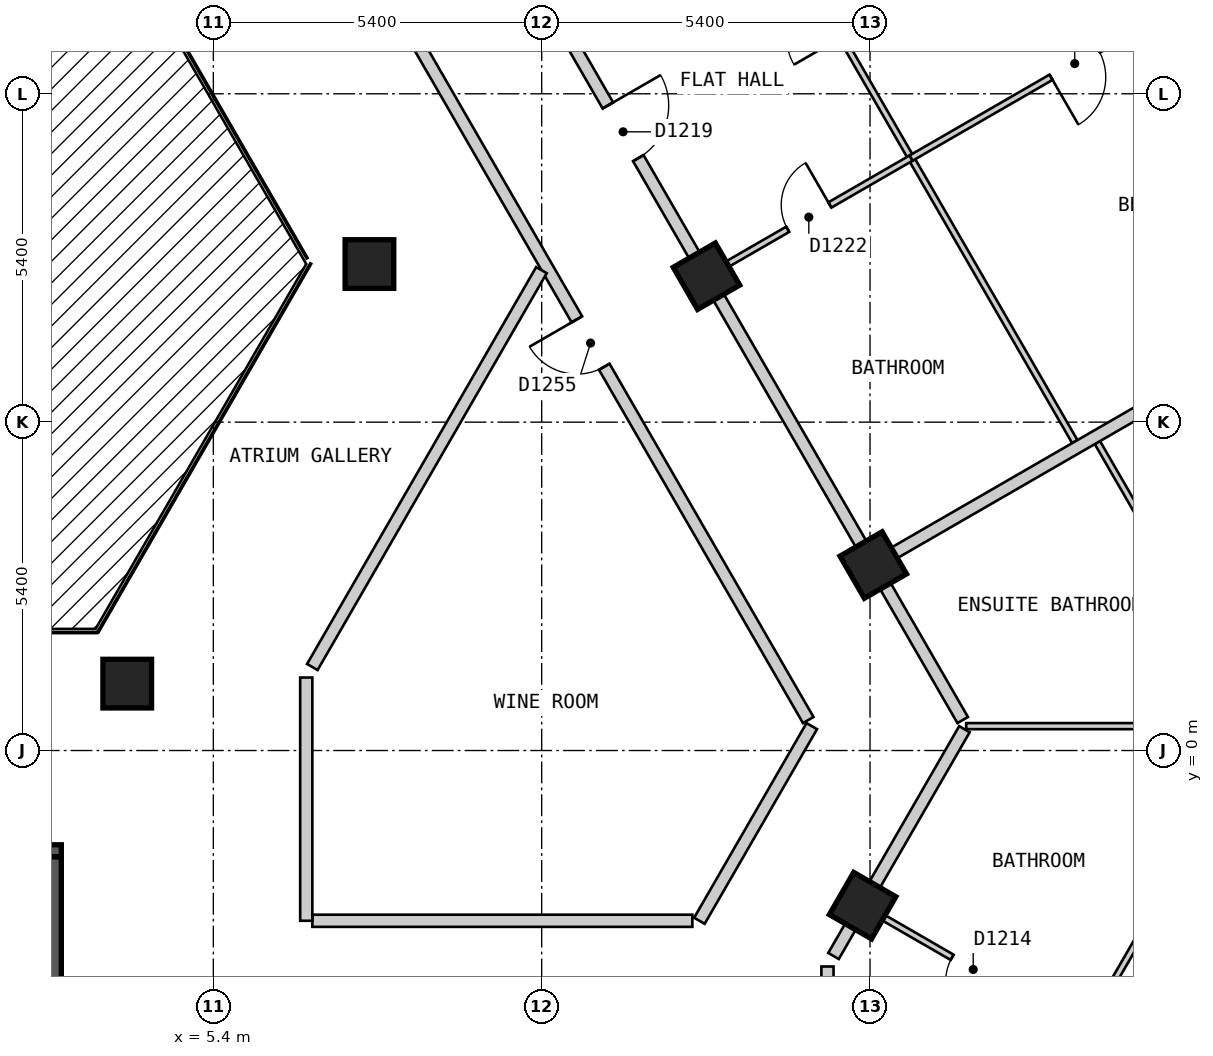
"""IFC4 building model, lengths in metres.
Left out: names, types, materials, properties, quantities, classifications, styles, units other than length and angle.
Written with IfcOpenShell. Run it as: python <this file> out.ifc"""

import sys

from ifc_helpers import new_model, si_unit, direction, frame, frame_2d, origin, origin_2d, place, context, subcontext, project, spatial, polyline, rectangle, outline, extrude, element, fill, save


model = new_model("IFC4")
c1 = context("Model", 3, precision=1e-05, world=origin(), true_north=direction((0.0, 1.0)))
c2 = subcontext(c1, "Body", "Model", "MODEL_VIEW")
j1 = project(units=[si_unit("LENGTHUNIT", "METRE"), si_unit("PLANEANGLEUNIT", "RADIAN")], contexts=[c1])
p1 = place(None, origin())
s1 = spatial("IfcSite", under=j1, at=p1, CompositionType="ELEMENT")
p2 = place(p1, origin())
s2 = spatial("IfcBuilding", under=s1, at=p2, CompositionType="ELEMENT")
p3 = place(p2, frame((0.0, 0.0, 129.6)))
s3 = spatial("IfcBuildingStorey", under=s2, at=p3, CompositionType="ELEMENT", Elevation=129.6)
for number, where, z_axis, x_axis in (
    (1, (16.078, -2.551, 0.0), (0.0, 0.0, 1.0), (0.5, 0.866, 0.0)),
    (2, (16.253, 3.05, 0.0), (0.0, 0.0, 1.0), (-0.5, 0.866, 0.0)),
    (3, (3.984, 1.1, 0.0), (0.0, 0.0, 1.0), (1.0, 0.0, 0.0)),
    (4, (13.51, 7.8, 0.0), (0.0, 0.0, 1.0), (-0.5, 0.866, 0.0)),
    (5, (7.967, 8.0, 0.0), (0.0, 0.0, 1.0), (1.0, 0.0, 0.0)),
):
    element("IfcColumn", number, at=place(p3, frame(where, z_axis=z_axis, x_axis=x_axis)), inside=s3, PredefinedType="COLUMN", context=c2, shape_type="SweptSolid", body=[
        extrude(rectangle(XDim=0.8, YDim=0.8, at=origin_2d()), origin(), (0.0, 0.0, 1.0), 3.0),
    ])
p4 = place(p3, frame((15.862, -23.425, 0.0), z_axis=(0.0, 0.0, 1.0), x_axis=(0.500017503135, 0.866015298109, 0.0)))
e6 = element("IfcWall", 6, at=p4, inside=s3, PredefinedType="SOLIDWALL", context=c2, shape_type="SweptSolid", body=[
    extrude(outline(polyline([(0.0, -0.15), (24.711, -0.15), (24.631, 0.15), (0.08, 0.15), (0.0, -0.15)])), origin(), (0.0, 0.0, 1.0), 2.7),
])
p5 = place(p4, frame((2.857, 0.0, 0.15)))
e7 = element("IfcOpeningElement", 7, at=p5, cuts=e6, PredefinedType="OPENING", context=c2, shape_type="SweptSolid", body=[
    extrude(rectangle(XDim=1.5, YDim=2.1, at=frame_2d((0.75, 1.05))), frame((0.0, 0.16, 0.0), z_axis=(0.0, -1.0, 0.0), x_axis=(1.0, 0.0, 0.0)), (0.0, 0.0, 1.0), 0.32),
])
p6 = place(p4, frame((8.689, 0.0, 0.15)))
e8 = element("IfcOpeningElement", 8, at=p6, cuts=e6, PredefinedType="OPENING", context=c2, shape_type="SweptSolid", body=[
    extrude(rectangle(XDim=1.5, YDim=2.1, at=frame_2d((0.75, 1.05))), frame((0.0, 0.16, 0.0), z_axis=(0.0, -1.0, 0.0), x_axis=(1.0, 0.0, 0.0)), (0.0, 0.0, 1.0), 0.32),
])
p7 = place(p4, frame((14.52, 0.0, 0.15)))
e9 = element("IfcOpeningElement", 9, at=p7, cuts=e6, PredefinedType="OPENING", context=c2, shape_type="SweptSolid", body=[
    extrude(rectangle(XDim=1.5, YDim=2.1, at=frame_2d((0.75, 1.05))), frame((0.0, 0.16, 0.0), z_axis=(0.0, -1.0, 0.0), x_axis=(1.0, 0.0, 0.0)), (0.0, 0.0, 1.0), 0.32),
])
p8 = place(p4, frame((20.351, 0.0, 0.15)))
e10 = element("IfcOpeningElement", 10, at=p8, cuts=e6, PredefinedType="OPENING", context=c2, shape_type="SweptSolid", body=[
    extrude(rectangle(XDim=1.5, YDim=2.1, at=frame_2d((0.75, 1.05))), frame((0.0, 0.16, 0.0), z_axis=(0.0, -1.0, 0.0), x_axis=(1.0, 0.0, 0.0)), (0.0, 0.0, 1.0), 0.32),
])
p9 = place(p3, frame((28.218, 2.825, 0.0), z_axis=(0.0, 0.0, 1.0), x_axis=(-0.500020536353, 0.866013546791, 0.0)))
e11 = element("IfcWall", 11, at=p9, inside=s3, PredefinedType="SOLIDWALL", context=c2, shape_type="SweptSolid", body=[
    extrude(outline(polyline([(0.0, -0.15), (23.325, -0.15), (23.245, 0.15), (0.08, 0.15), (0.0, -0.15)])), origin(), (0.0, 0.0, 1.0), 2.7),
])
p10 = place(p9, frame((2.685, 0.0, 0.15)))
e12 = element("IfcOpeningElement", 12, at=p10, cuts=e11, PredefinedType="OPENING", context=c2, shape_type="SweptSolid", body=[
    extrude(rectangle(XDim=1.5, YDim=2.1, at=frame_2d((0.75, 1.05))), frame((0.0, 0.16, 0.0), z_axis=(0.0, -1.0, 0.0), x_axis=(1.0, 0.0, 0.0)), (0.0, 0.0, 1.0), 0.32),
])
p11 = place(p9, frame((8.17, 0.0, 0.15)))
e13 = element("IfcOpeningElement", 13, at=p11, cuts=e11, PredefinedType="OPENING", context=c2, shape_type="SweptSolid", body=[
    extrude(rectangle(XDim=1.5, YDim=2.1, at=frame_2d((0.75, 1.05))), frame((0.0, 0.16, 0.0), z_axis=(0.0, -1.0, 0.0), x_axis=(1.0, 0.0, 0.0)), (0.0, 0.0, 1.0), 0.32),
])
p12 = place(p9, frame((13.655, 0.0, 0.15)))
e14 = element("IfcOpeningElement", 14, at=p12, cuts=e11, PredefinedType="OPENING", context=c2, shape_type="SweptSolid", body=[
    extrude(rectangle(XDim=1.5, YDim=2.1, at=frame_2d((0.75, 1.05))), frame((0.0, 0.16, 0.0), z_axis=(0.0, -1.0, 0.0), x_axis=(1.0, 0.0, 0.0)), (0.0, 0.0, 1.0), 0.32),
])
p13 = place(p9, frame((19.14, 0.0, 0.15)))
e15 = element("IfcOpeningElement", 15, at=p13, cuts=e11, PredefinedType="OPENING", context=c2, shape_type="SweptSolid", body=[
    extrude(rectangle(XDim=1.5, YDim=2.1, at=frame_2d((0.75, 1.05))), frame((0.0, 0.16, 0.0), z_axis=(0.0, -1.0, 0.0), x_axis=(1.0, 0.0, 0.0)), (0.0, 0.0, 1.0), 0.32),
])
p14 = place(p3, frame((-2.9, -1.65, 0.0), z_axis=(0.0, 0.0, 1.0), x_axis=(1.0, 0.0, 0.0)))
e16 = element("IfcWall", 16, at=p14, inside=s3, PredefinedType="SOLIDWALL", context=c2, shape_type="SweptSolid", body=[
    extrude(rectangle(XDim=5.8, YDim=0.2, at=frame_2d((2.9, 0.0))), origin(), (0.0, 0.0, 1.0), 2.7),
])
p15 = place(p14, frame((0.3, 0.0, 0.0)))
e17 = element("IfcOpeningElement", 17, at=p15, cuts=e16, PredefinedType="OPENING", context=c2, shape_type="SweptSolid", body=[
    extrude(rectangle(XDim=1.2, YDim=2.1, at=frame_2d((0.6, 1.05))), frame((0.0, 0.11, 0.0), z_axis=(0.0, -1.0, 0.0), x_axis=(1.0, 0.0, 0.0)), (0.0, 0.0, 1.0), 0.22),
])
p16 = place(p3, frame((2.8, -4.5, 0.0), z_axis=(0.0, 0.0, 1.0), x_axis=(0.0, 1.0, 0.0)))
e18 = element("IfcWall", 18, at=p16, inside=s3, PredefinedType="SOLIDWALL", context=c2, shape_type="SweptSolid", body=[
    extrude(rectangle(XDim=2.75, YDim=0.2, at=frame_2d((1.375, 0.0))), origin(), (0.0, 0.0, 1.0), 2.7),
])
p17 = place(p3, frame((7.967, 13.0, 0.0), z_axis=(0.0, 0.0, 1.0), x_axis=(0.50003774998, -0.866003607726, 0.0)))
e19 = element("IfcWall", 19, at=p17, inside=s3, PredefinedType="PARTITIONING", context=c2, shape_type="SweptSolid", body=[
    extrude(rectangle(XDim=14.433, YDim=0.2, at=frame_2d((7.217, 0.0))), origin(), (0.0, 0.0, 1.0), 2.7),
])
p18 = place(p17, frame((6.824, 0.0, 0.0)))
e20 = element("IfcOpeningElement", 20, at=p18, cuts=e19, PredefinedType="OPENING", context=c2, shape_type="SweptSolid", body=[
    extrude(rectangle(XDim=0.9, YDim=2.1, at=frame_2d((0.45, 1.05))), frame((0.0, 0.11, 0.0), z_axis=(0.0, -1.0, 0.0), x_axis=(1.0, 0.0, 0.0)), (0.0, 0.0, 1.0), 0.22),
])
p19 = place(p3, frame((9.296, 15.1, 0.0), z_axis=(0.0, 0.0, 1.0), x_axis=(0.499974024244, -0.866040400375, 0.0)))
e21 = element("IfcWall", 21, at=p19, inside=s3, PredefinedType="PARTITIONING", context=c2, shape_type="SweptSolid", body=[
    extrude(rectangle(XDim=16.857, YDim=0.2, at=frame_2d((8.429, 0.0))), origin(), (0.0, 0.0, 1.0), 2.7),
])
p20 = place(p19, frame((5.187, 0.0, 0.0)))
e22 = element("IfcOpeningElement", 22, at=p20, cuts=e21, PredefinedType="OPENING", context=c2, shape_type="SweptSolid", body=[
    extrude(rectangle(XDim=1.0, YDim=2.1, at=frame_2d((0.5, 1.05))), frame((0.0, 0.11, 0.0), z_axis=(0.0, -1.0, 0.0), x_axis=(1.0, 0.0, 0.0)), (0.0, 0.0, 1.0), 0.22),
])
p21 = place(p3, frame((7.028, -2.8, 0.0), z_axis=(0.0, 0.0, 1.0), x_axis=(1.0, 0.0, 0.0)))
e23 = element("IfcWall", 23, at=p21, inside=s3, PredefinedType="PARTITIONING", context=c2, shape_type="SweptSolid", body=[
    extrude(rectangle(XDim=6.25, YDim=0.2, at=frame_2d((3.125, 0.0))), origin(), (0.0, 0.0, 1.0), 2.7),
])
p22 = place(p3, frame((7.028, 1.373, 0.0), z_axis=(0.0, 0.0, 1.0), x_axis=(0.499954271211, 0.866051803703, 0.0)))
e24 = element("IfcWall", 24, at=p22, inside=s3, PredefinedType="PARTITIONING", context=c2, shape_type="SweptSolid", body=[
    extrude(rectangle(XDim=7.536, YDim=0.2, at=frame_2d((3.768, 0.0))), origin(), (0.0, 0.0, 1.0), 2.7),
])
p23 = place(p3, frame((13.394, -2.8, 0.0), z_axis=(0.0, 0.0, 1.0), x_axis=(0.499968324138, 0.866043691079, 0.0)))
e25 = element("IfcWall", 25, at=p23, inside=s3, PredefinedType="PARTITIONING", context=c2, shape_type="SweptSolid", body=[
    extrude(rectangle(XDim=3.696, YDim=0.2, at=frame_2d((1.848, 0.0))), origin(), (0.0, 0.0, 1.0), 2.7),
])
p24 = place(p3, frame((15.6, -3.379, 0.0), z_axis=(0.0, 0.0, 1.0), x_axis=(0.499882759391, 0.866093082101, 0.0)))
e26 = element("IfcWall", 26, at=p24, inside=s3, PredefinedType="PARTITIONING", context=c2, shape_type="SweptSolid", body=[
    extrude(rectangle(XDim=4.307, YDim=0.2, at=frame_2d((2.153, 0.0))), origin(), (0.0, 0.0, 1.0), 2.7),
])
p25 = place(p3, frame((6.928, -2.8, 0.0), z_axis=(0.0, 0.0, 1.0), x_axis=(0.0, 1.0, 0.0)))
e27 = element("IfcWall", 27, at=p25, inside=s3, PredefinedType="PARTITIONING", context=c2, shape_type="SweptSolid", body=[
    extrude(rectangle(XDim=4.0, YDim=0.2, at=frame_2d((2.0, 0.0))), origin(), (0.0, 0.0, 1.0), 2.7),
])
p26 = place(p3, frame((15.5, -21.199, 0.0), z_axis=(0.0, 0.0, 1.0), x_axis=(0.0, 1.0, 0.0)))
e28 = element("IfcWall", 28, at=p26, inside=s3, PredefinedType="PARTITIONING", context=c2, shape_type="SweptSolid", body=[
    extrude(rectangle(XDim=17.647, YDim=0.2, at=frame_2d((8.823, 0.0))), origin(), (0.0, 0.0, 1.0), 2.7),
])
p27 = place(p26, frame((14.934, 0.0, 0.0)))
e29 = element("IfcOpeningElement", 29, at=p27, cuts=e28, PredefinedType="OPENING", context=c2, shape_type="SweptSolid", body=[
    extrude(rectangle(XDim=1.0, YDim=2.1, at=frame_2d((0.5, 1.05))), frame((0.0, 0.11, 0.0), z_axis=(0.0, -1.0, 0.0), x_axis=(1.0, 0.0, 0.0)), (0.0, 0.0, 1.0), 0.22),
])
p28 = place(p3, frame((11.539, 18.986, 0.0), z_axis=(0.0, 0.0, 1.0), x_axis=(0.500019453803, -0.866014171835, 0.0)))
e30 = element("IfcWall", 30, at=p28, inside=s3, PredefinedType="PARTITIONING", context=c2, shape_type="SweptSolid", body=[
    extrude(rectangle(XDim=16.057, YDim=0.1, at=frame_2d((8.029, 0.0))), origin(), (0.0, 0.0, 1.0), 2.7),
])
p29 = place(p28, frame((7.48, 0.0, 0.0)))
e31 = element("IfcOpeningElement", 31, at=p29, cuts=e30, PredefinedType="OPENING", context=c2, shape_type="SweptSolid", body=[
    extrude(rectangle(XDim=0.9, YDim=2.1, at=frame_2d((0.45, 1.05))), frame((0.0, 0.06, 0.0), z_axis=(0.0, -1.0, 0.0), x_axis=(1.0, 0.0, 0.0)), (0.0, 0.0, 1.0), 0.12),
])
p30 = place(p3, frame((19.94, 5.063, 0.0), z_axis=(0.0, 0.0, 1.0), x_axis=(0.500025085526, -0.866010920165, 0.0)))
e32 = element("IfcWall", 32, at=p30, inside=s3, PredefinedType="PARTITIONING", context=c2, shape_type="SweptSolid", body=[
    extrude(rectangle(XDim=5.284, YDim=0.1, at=frame_2d((2.642, 0.0))), origin(), (0.0, 0.0, 1.0), 2.7),
])
p31 = place(p30, frame((2.242, 0.0, 0.0)))
e33 = element("IfcOpeningElement", 33, at=p31, cuts=e32, PredefinedType="OPENING", context=c2, shape_type="SweptSolid", body=[
    extrude(rectangle(XDim=0.8, YDim=2.1, at=frame_2d((0.4, 1.05))), frame((0.0, 0.06, 0.0), z_axis=(0.0, -1.0, 0.0), x_axis=(1.0, 0.0, 0.0)), (0.0, 0.0, 1.0), 0.12),
])
p32 = place(p3, frame((16.165, -2.601, 0.0), z_axis=(0.0, 0.0, 1.0), x_axis=(0.866016855193, -0.500014806302, 0.0)))
e34 = element("IfcWall", 34, at=p32, inside=s3, PredefinedType="PARTITIONING", context=c2, shape_type="SweptSolid", body=[
    extrude(rectangle(XDim=10.0, YDim=0.1, at=frame_2d((5.0, 0.0))), origin(), (0.0, 0.0, 1.0), 2.7),
])
p33 = place(p32, frame((1.6, 0.0, 0.0)))
e35 = element("IfcOpeningElement", 35, at=p33, cuts=e34, PredefinedType="OPENING", context=c2, shape_type="SweptSolid", body=[
    extrude(rectangle(XDim=0.8, YDim=2.1, at=frame_2d((0.4, 1.05))), frame((0.0, 0.06, 0.0), z_axis=(0.0, -1.0, 0.0), x_axis=(1.0, 0.0, 0.0)), (0.0, 0.0, 1.0), 0.12),
])
p34 = place(p32, frame((6.6, 0.0, 0.0)))
e36 = element("IfcOpeningElement", 36, at=p34, cuts=e34, PredefinedType="OPENING", context=c2, shape_type="SweptSolid", body=[
    extrude(rectangle(XDim=0.9, YDim=2.1, at=frame_2d((0.45, 1.05))), frame((0.0, 0.06, 0.0), z_axis=(0.0, -1.0, 0.0), x_axis=(1.0, 0.0, 0.0)), (0.0, 0.0, 1.0), 0.12),
])
p35 = place(p3, frame((17.782, 0.401, 0.0), z_axis=(0.0, 0.0, 1.0), x_axis=(1.0, 0.0, 0.0)))
e37 = element("IfcWall", 37, at=p35, inside=s3, PredefinedType="PARTITIONING", context=c2, shape_type="SweptSolid", body=[
    extrude(rectangle(XDim=4.747, YDim=0.1, at=frame_2d((2.374, 0.0))), origin(), (0.0, 0.0, 1.0), 2.7),
])
p36 = place(p3, frame((19.765, -4.564, 0.0), z_axis=(0.0, 0.0, 1.0), x_axis=(0.500060182325, 0.865990654714, 0.0)))
e38 = element("IfcWall", 38, at=p36, inside=s3, PredefinedType="PARTITIONING", context=c2, shape_type="SweptSolid", body=[
    extrude(rectangle(XDim=5.632, YDim=0.1, at=frame_2d((2.816, 0.0))), origin(), (0.0, 0.0, 1.0), 2.7),
])
p37 = place(p3, frame((13.597, 7.85, 0.0), z_axis=(0.0, 0.0, 1.0), x_axis=(0.8660642533, 0.499932704626, 0.0)))
e39 = element("IfcWall", 39, at=p37, inside=s3, PredefinedType="PARTITIONING", context=c2, shape_type="SweptSolid", body=[
    extrude(rectangle(XDim=3.786, YDim=0.1, at=frame_2d((1.893, 0.0))), origin(), (0.0, 0.0, 1.0), 2.7),
])
p38 = place(p37, frame((1.443, 0.0, 0.0)))
e40 = element("IfcOpeningElement", 40, at=p38, cuts=e39, PredefinedType="OPENING", context=c2, shape_type="SweptSolid", body=[
    extrude(rectangle(XDim=0.8, YDim=2.1, at=frame_2d((0.4, 1.05))), frame((0.0, 0.06, 0.0), z_axis=(0.0, -1.0, 0.0), x_axis=(1.0, 0.0, 0.0)), (0.0, 0.0, 1.0), 0.12),
])
p39 = place(p3, frame((16.339, 3.1, 0.0), z_axis=(0.0, 0.0, 1.0), x_axis=(0.866016855193, 0.500014806302, 0.0)))
e41 = element("IfcWall", 41, at=p39, inside=s3, PredefinedType="PARTITIONING", context=c2, shape_type="SweptSolid", body=[
    extrude(rectangle(XDim=10.0, YDim=0.2, at=frame_2d((5.0, 0.0))), origin(), (0.0, 0.0, 1.0), 2.7),
])
p40 = place(p3, frame((16.876, 9.743, 0.0), z_axis=(0.0, 0.0, 1.0), x_axis=(0.865997794851, 0.500047817026, 0.0)))
e42 = element("IfcWall", 42, at=p40, inside=s3, PredefinedType="PARTITIONING", context=c2, shape_type="SweptSolid", body=[
    extrude(rectangle(XDim=6.214, YDim=0.1, at=frame_2d((3.107, 0.0))), origin(), (0.0, 0.0, 1.0), 2.7),
])
p41 = place(p40, frame((2.657, 0.0, 0.0)))
e43 = element("IfcOpeningElement", 43, at=p41, cuts=e42, PredefinedType="OPENING", context=c2, shape_type="SweptSolid", body=[
    extrude(rectangle(XDim=0.9, YDim=2.1, at=frame_2d((0.45, 1.05))), frame((0.0, 0.06, 0.0), z_axis=(0.0, -1.0, 0.0), x_axis=(1.0, 0.0, 0.0)), (0.0, 0.0, 1.0), 0.12),
])
p42 = place(p33, origin())
e44 = element("IfcDoor", 44, at=p42, inside=s3, OperationType="SINGLE_SWING_RIGHT", PredefinedType="DOOR", context=c2, shape_type="SweptSolid", body=[
    extrude(rectangle(XDim=0.8, YDim=2.1, at=frame_2d((0.4, 1.05))), frame((0.0, 0.025, 0.0), z_axis=(0.0, -1.0, 0.0), x_axis=(1.0, 0.0, 0.0)), (0.0, 0.0, 1.0), 0.05),
])
fill(e35, e44)
p43 = place(p20, origin())
e45 = element("IfcDoor", 45, at=p43, inside=s3, OperationType="SINGLE_SWING_LEFT", PredefinedType="DOOR", context=c2, shape_type="SweptSolid", body=[
    extrude(rectangle(XDim=1.0, YDim=2.1, at=frame_2d((0.5, 1.05))), frame((0.0, 0.025, 0.0), z_axis=(0.0, -1.0, 0.0), x_axis=(1.0, 0.0, 0.0)), (0.0, 0.0, 1.0), 0.05),
])
fill(e22, e45)
p44 = place(p38, origin())
e46 = element("IfcDoor", 46, at=p44, inside=s3, OperationType="SINGLE_SWING_RIGHT", PredefinedType="DOOR", context=c2, shape_type="SweptSolid", body=[
    extrude(rectangle(XDim=0.8, YDim=2.1, at=frame_2d((0.4, 1.05))), frame((0.0, 0.025, 0.0), z_axis=(0.0, -1.0, 0.0), x_axis=(1.0, 0.0, 0.0)), (0.0, 0.0, 1.0), 0.05),
])
fill(e40, e46)
p45 = place(p41, origin())
e47 = element("IfcDoor", 47, at=p45, inside=s3, OperationType="SINGLE_SWING_LEFT", PredefinedType="DOOR", context=c2, shape_type="SweptSolid", body=[
    extrude(rectangle(XDim=0.9, YDim=2.1, at=frame_2d((0.45, 1.05))), frame((0.0, 0.025, 0.0), z_axis=(0.0, -1.0, 0.0), x_axis=(1.0, 0.0, 0.0)), (0.0, 0.0, 1.0), 0.05),
])
fill(e43, e47)
p46 = place(p18, origin())
e48 = element("IfcDoor", 48, at=p46, inside=s3, OperationType="SINGLE_SWING_LEFT", PredefinedType="DOOR", context=c2, shape_type="SweptSolid", body=[
    extrude(rectangle(XDim=0.9, YDim=2.1, at=frame_2d((0.45, 1.05))), frame((0.0, 0.025, 0.0), z_axis=(0.0, -1.0, 0.0), x_axis=(1.0, 0.0, 0.0)), (0.0, 0.0, 1.0), 0.05),
])
fill(e20, e48)
save(model, sys.argv[1])
